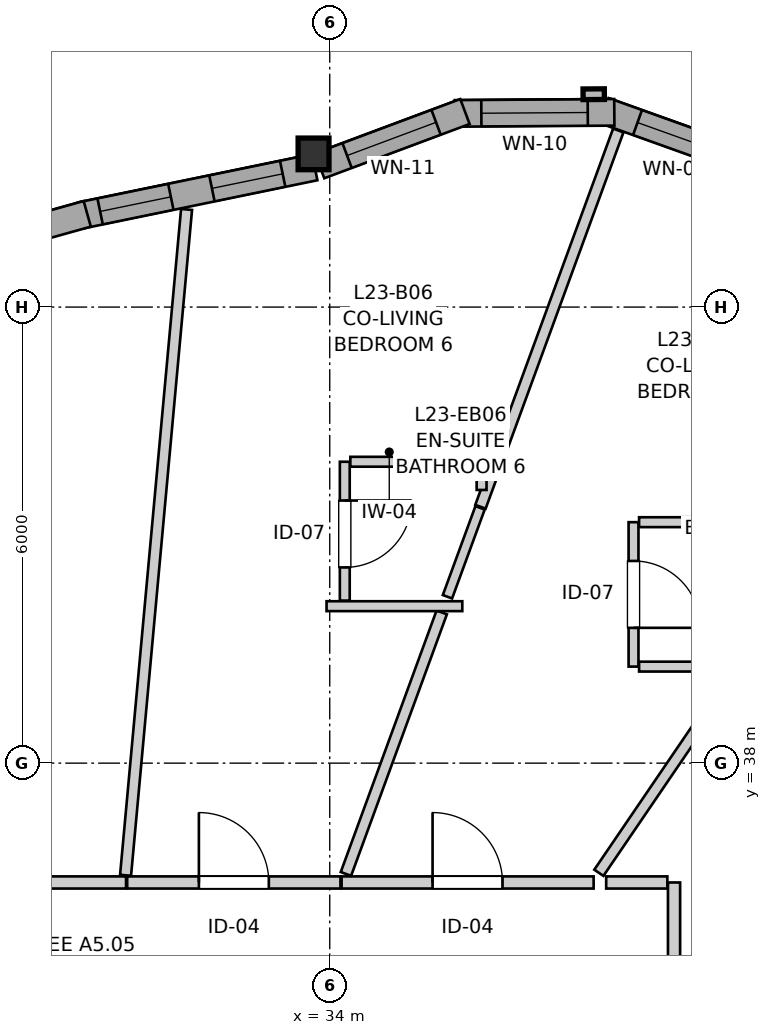
"""IFC4 building model, lengths in metres.
Left out: names, types, materials, properties, quantities, classifications, styles, units other than length and angle.
Written with IfcOpenShell. Run it as: python <this file> out.ifc"""

import sys

from ifc_helpers import new_model, si_unit, direction, frame, frame_2d, origin, origin_2d, place, context, subcontext, project, spatial, rectangle, i_section, extrude, source, transform, mapped, element, fill, save


model = new_model("IFC4")
c1 = context("Model", 3, precision=1e-05, world=origin(), true_north=direction((0.0, 1.0)))
c2 = subcontext(c1, "Body", "Model", "MODEL_VIEW")
j1 = project(units=[si_unit("LENGTHUNIT", "METRE"), si_unit("PLANEANGLEUNIT", "RADIAN")], contexts=[c1])
p1 = place(None, origin())
s1 = spatial("IfcSite", under=j1, at=p1, CompositionType="ELEMENT")
p2 = place(p1, origin())
s2 = spatial("IfcBuilding", under=s1, at=p2, CompositionType="ELEMENT")
p3 = place(p2, frame((0.0, 0.0, 80.0)))
s3 = spatial("IfcBuildingStorey", under=s2, at=p3, CompositionType="ELEMENT", Elevation=80.0)
m1 = source(origin(), c2, "Body", "SweptSolid", [
    extrude(i_section(OverallWidth=0.406, OverallDepth=0.416, WebThickness=0.027, FlangeThickness=0.044, FilletRadius=0.015, at=origin_2d()), origin(), (0.0, 0.0, 1.0), 2.935),
])
p4 = place(p3, frame((33.787, 46.015, 0.0), z_axis=(0.0, 0.0, 1.0), x_axis=(1.0, 0.0, 0.0)))
e1 = element("IfcColumn", 1, at=p4, inside=s3, PredefinedType="PILASTER", context=c2, shape_type="MappedRepresentation", body=[
    mapped(m1, transform((0.0, 0.0, 0.0), x_axis=(1.0, 0.0, 0.0), y_axis=(0.0, 1.0, 0.0), z_axis=(0.0, 0.0, 1.0), scale=1.0)),
])
p5 = place(p3, frame((39.586, 45.877, 0.0), z_axis=(0.0, 0.0, 1.0), x_axis=(-0.941473186867, 0.33708787936, 0.0)))
e2 = element("IfcWall", 2, at=p5, inside=s3, PredefinedType="SOLIDWALL", context=c2, shape_type="SweptSolid", body=[
    extrude(rectangle(XDim=2.099, YDim=0.35, at=frame_2d((1.049, 0.0))), origin(), (0.0, 0.0, 1.0), 2.465),
])
p6 = place(p5, frame((0.283, 0.0, 0.82)))
e3 = element("IfcOpeningElement", 3, at=p6, cuts=e2, PredefinedType="OPENING", context=c2, shape_type="SweptSolid", body=[
    extrude(rectangle(XDim=1.35, YDim=1.45, at=frame_2d((0.675, 0.725))), frame((0.0, 0.185, 0.0), z_axis=(0.0, -1.0, 0.0), x_axis=(1.0, 0.0, 0.0)), (0.0, 0.0, 1.0), 0.37),
])
p7 = place(p3, frame((37.744, 46.562, 0.0), z_axis=(0.0, 0.0, 1.0), x_axis=(-0.999976451414, -0.006862697526, 0.0)))
e4 = element("IfcWall", 4, at=p7, inside=s3, PredefinedType="SOLIDWALL", context=c2, shape_type="SweptSolid", body=[
    extrude(rectangle(XDim=2.099, YDim=0.35, at=frame_2d((1.049, 0.0))), origin(), (0.0, 0.0, 1.0), 2.465),
])
p8 = place(p7, frame((0.35, 0.0, 0.82)))
e5 = element("IfcOpeningElement", 5, at=p8, cuts=e4, PredefinedType="OPENING", context=c2, shape_type="SweptSolid", body=[
    extrude(rectangle(XDim=1.4, YDim=1.35, at=frame_2d((0.7, 0.675))), frame((0.0, 0.185, 0.0), z_axis=(0.0, -1.0, 0.0), x_axis=(1.0, 0.0, 0.0)), (0.0, 0.0, 1.0), 0.37),
])
p9 = place(p3, frame((35.779, 46.573, 0.0), z_axis=(0.0, 0.0, 1.0), x_axis=(-0.9368002254, -0.349864741994, 0.0)))
e6 = element("IfcWall", 6, at=p9, inside=s3, PredefinedType="SOLIDWALL", context=c2, shape_type="SweptSolid", body=[
    extrude(rectangle(XDim=2.041, YDim=0.35, at=frame_2d((1.021, 0.0))), origin(), (0.0, 0.0, 1.0), 2.465),
])
p10 = place(p9, frame((0.406, 0.0, 0.82)))
e7 = element("IfcOpeningElement", 7, at=p10, cuts=e6, PredefinedType="OPENING", context=c2, shape_type="SweptSolid", body=[
    extrude(rectangle(XDim=1.25, YDim=1.35, at=frame_2d((0.625, 0.675))), frame((0.0, 0.185, 0.0), z_axis=(0.0, -1.0, 0.0), x_axis=(1.0, 0.0, 0.0)), (0.0, 0.0, 1.0), 0.37),
])
p11 = place(p3, frame((33.803, 45.84, 0.0), z_axis=(0.0, 0.0, 1.0), x_axis=(-0.97943222174, -0.201773444777, 0.0)))
e8 = element("IfcWall", 8, at=p11, inside=s3, PredefinedType="SOLIDWALL", context=c2, shape_type="SweptSolid", body=[
    extrude(rectangle(XDim=3.144, YDim=0.35, at=frame_2d((1.572, 0.0))), origin(), (0.0, 0.0, 1.0), 2.465),
])
p12 = place(p11, frame((0.431, 0.0, 0.82)))
e9 = element("IfcOpeningElement", 9, at=p12, cuts=e8, PredefinedType="OPENING", context=c2, shape_type="SweptSolid", body=[
    extrude(rectangle(XDim=0.95, YDim=1.35, at=frame_2d((0.475, 0.675))), frame((0.0, 0.185, 0.0), z_axis=(0.0, -1.0, 0.0), x_axis=(1.0, 0.0, 0.0)), (0.0, 0.0, 1.0), 0.37),
])
p13 = place(p11, frame((1.933, 0.0, 0.82)))
e10 = element("IfcOpeningElement", 10, at=p13, cuts=e8, PredefinedType="OPENING", context=c2, shape_type="SweptSolid", body=[
    extrude(rectangle(XDim=0.95, YDim=1.35, at=frame_2d((0.475, 0.675))), frame((0.0, 0.185, 0.0), z_axis=(0.0, -1.0, 0.0), x_axis=(1.0, 0.0, 0.0)), (0.0, 0.0, 1.0), 0.37),
])
p14 = place(p3, frame((30.809, 45.227, 0.0), z_axis=(0.0, 0.0, 1.0), x_axis=(-0.963041637143, -0.269352566591, 0.0)))
e11 = element("IfcWall", 11, at=p14, inside=s3, PredefinedType="SOLIDWALL", context=c2, shape_type="SweptSolid", body=[
    extrude(rectangle(XDim=2.873, YDim=0.35, at=frame_2d((1.437, 0.0))), origin(), (0.0, 0.0, 1.0), 2.465),
])
p15 = place(p14, frame((0.717, 0.0, 0.82)))
e12 = element("IfcOpeningElement", 12, at=p15, cuts=e11, PredefinedType="OPENING", context=c2, shape_type="SweptSolid", body=[
    extrude(rectangle(XDim=1.45, YDim=1.25, at=frame_2d((0.725, 0.625))), frame((0.0, 0.185, 0.0), z_axis=(0.0, -1.0, 0.0), x_axis=(1.0, 0.0, 0.0)), (0.0, 0.0, 1.0), 0.37),
])
p16 = place(p3, frame((38.53, 36.43, 0.0), z_axis=(0.0, 0.0, 1.0), x_axis=(0.0, -1.0, 0.0)))
e13 = element("IfcWall", 13, at=p16, inside=s3, PredefinedType="PARTITIONING", context=c2, shape_type="SweptSolid", body=[
    extrude(rectangle(XDim=4.559, YDim=0.16, at=frame_2d((2.279, 0.0))), origin(), (0.0, 0.0, 1.0), 2.573),
])
p17 = place(p16, frame((1.646, 0.0, 0.0)))
e14 = element("IfcOpeningElement", 14, at=p17, cuts=e13, PredefinedType="OPENING", context=c2, shape_type="SweptSolid", body=[
    extrude(rectangle(XDim=1.3, YDim=2.1, at=frame_2d((0.65, 1.05))), frame((0.0, 0.09, 0.0), z_axis=(0.0, -1.0, 0.0), x_axis=(1.0, 0.0, 0.0)), (0.0, 0.0, 1.0), 0.18),
])
p18 = place(p3, frame((27.307, 36.43, 0.0), z_axis=(0.0, 0.0, 1.0), x_axis=(1.0, 0.0, 0.0)))
e15 = element("IfcWall", 15, at=p18, inside=s3, PredefinedType="PARTITIONING", context=c2, shape_type="SweptSolid", body=[
    extrude(rectangle(XDim=4.013, YDim=0.16, at=frame_2d((2.007, 0.0))), origin(), (0.0, 0.0, 1.0), 2.935),
])
p19 = place(p18, frame((0.22, 0.0, 0.0)))
e16 = element("IfcOpeningElement", 16, at=p19, cuts=e15, PredefinedType="OPENING", context=c2, shape_type="SweptSolid", body=[
    extrude(rectangle(XDim=0.96, YDim=2.1, at=frame_2d((0.48, 1.05))), frame((0.0, 0.09, 0.0), z_axis=(0.0, -1.0, 0.0), x_axis=(1.0, 0.0, 0.0)), (0.0, 0.0, 1.0), 0.18),
])
p20 = place(p3, frame((34.156, 36.43, 0.0), z_axis=(0.0, 0.0, 1.0), x_axis=(1.0, 0.0, 0.0)))
e17 = element("IfcWall", 17, at=p20, inside=s3, PredefinedType="PARTITIONING", context=c2, shape_type="SweptSolid", body=[
    extrude(rectangle(XDim=3.316, YDim=0.16, at=frame_2d((1.658, 0.0))), origin(), (0.0, 0.0, 1.0), 2.935),
])
p21 = place(p20, frame((1.197, 0.0, 0.0)))
e18 = element("IfcOpeningElement", 18, at=p21, cuts=e17, PredefinedType="OPENING", context=c2, shape_type="SweptSolid", body=[
    extrude(rectangle(XDim=0.92, YDim=2.1, at=frame_2d((0.46, 1.05))), frame((0.0, 0.09, 0.0), z_axis=(0.0, -1.0, 0.0), x_axis=(1.0, 0.0, 0.0)), (0.0, 0.0, 1.0), 0.18),
])
p22 = place(p3, frame((31.335, 36.43, 0.0), z_axis=(0.0, 0.0, 1.0), x_axis=(1.0, 0.0, 0.0)))
e19 = element("IfcWall", 19, at=p22, inside=s3, PredefinedType="PARTITIONING", context=c2, shape_type="SweptSolid", body=[
    extrude(rectangle(XDim=2.806, YDim=0.16, at=frame_2d((1.403, 0.0))), origin(), (0.0, 0.0, 1.0), 2.935),
])
p23 = place(p22, frame((0.944, 0.0, 0.0)))
e20 = element("IfcOpeningElement", 20, at=p23, cuts=e19, PredefinedType="OPENING", context=c2, shape_type="SweptSolid", body=[
    extrude(rectangle(XDim=0.92, YDim=2.1, at=frame_2d((0.46, 1.05))), frame((0.0, 0.09, 0.0), z_axis=(0.0, -1.0, 0.0), x_axis=(1.0, 0.0, 0.0)), (0.0, 0.0, 1.0), 0.18),
])
p24 = place(p3, frame((34.198, 41.965, 0.0), z_axis=(0.0, 0.0, 1.0), x_axis=(0.0, -1.0, 0.0)))
e21 = element("IfcWall", 21, at=p24, inside=s3, PredefinedType="PARTITIONING", context=c2, shape_type="SweptSolid", body=[
    extrude(rectangle(XDim=1.827, YDim=0.13, at=frame_2d((0.914, 0.0))), origin(), (0.0, 0.0, 1.0), 2.935),
])
p25 = place(p24, frame((0.51, 0.0, 0.0)))
e22 = element("IfcOpeningElement", 22, at=p25, cuts=e21, PredefinedType="OPENING", context=c2, shape_type="SweptSolid", body=[
    extrude(rectangle(XDim=0.88, YDim=2.05, at=frame_2d((0.44, 1.025))), frame((0.0, 0.075, 0.0), z_axis=(0.0, -1.0, 0.0), x_axis=(1.0, 0.0, 0.0)), (0.0, 0.0, 1.0), 0.15),
])
p26 = place(p3, frame((37.997, 41.17, 0.0), z_axis=(0.0, 0.0, 1.0), x_axis=(0.0, -1.0, 0.0)))
e23 = element("IfcWall", 23, at=p26, inside=s3, PredefinedType="PARTITIONING", context=c2, shape_type="SweptSolid", body=[
    extrude(rectangle(XDim=1.9, YDim=0.13, at=frame_2d((0.95, 0.0))), origin(), (0.0, 0.0, 1.0), 2.935),
])
p27 = place(p26, frame((0.51, 0.0, 0.0)))
e24 = element("IfcOpeningElement", 24, at=p27, cuts=e23, PredefinedType="OPENING", context=c2, shape_type="SweptSolid", body=[
    extrude(rectangle(XDim=0.88, YDim=2.05, at=frame_2d((0.44, 1.025))), frame((0.0, 0.075, 0.0), z_axis=(0.0, -1.0, 0.0), x_axis=(1.0, 0.0, 0.0)), (0.0, 0.0, 1.0), 0.15),
])
p28 = place(p3, frame((31.314, 36.525, 0.0), z_axis=(0.0, 0.0, 1.0), x_axis=(0.091226381691, 0.995830179942, 0.0)))
e25 = element("IfcWall", 25, at=p28, inside=s3, PredefinedType="PARTITIONING", context=c2, shape_type="SweptSolid", body=[
    extrude(rectangle(XDim=8.797, YDim=0.145, at=frame_2d((4.398, 0.0))), origin(), (0.0, 0.0, 1.0), 2.935),
])
p29 = place(p3, frame((38.659, 31.93, 0.0), z_axis=(0.0, 0.0, 1.0), x_axis=(0.813936175568, 0.580954302938, 0.0)))
e26 = element("IfcWall", 26, at=p29, inside=s3, PredefinedType="PARTITIONING", context=c2, shape_type="SweptSolid", body=[
    extrude(rectangle(XDim=6.346, YDim=0.145, at=frame_2d((3.173, 0.0))), origin(), (0.0, 0.0, 1.0), 2.935),
])
p30 = place(p3, frame((35.983, 41.373, 0.0), z_axis=(0.0, 0.0, 1.0), x_axis=(0.343972978133, 0.938979547335, 0.0)))
e27 = element("IfcWall", 27, at=p30, inside=s3, PredefinedType="PARTITIONING", context=c2, shape_type="SweptSolid", body=[
    extrude(rectangle(XDim=5.272, YDim=0.145, at=frame_2d((2.636, 0.0))), origin(), (0.0, 0.0, 1.0), 2.935),
])
p31 = place(p3, frame((34.213, 36.542, 0.0), z_axis=(0.0, 0.0, 1.0), x_axis=(0.343978558693, 0.93897750301, 0.0)))
e28 = element("IfcWall", 28, at=p31, inside=s3, PredefinedType="PARTITIONING", context=c2, shape_type="SweptSolid", body=[
    extrude(rectangle(XDim=3.664, YDim=0.145, at=frame_2d((1.832, 0.0))), origin(), (0.0, 0.0, 1.0), 2.935),
])
p32 = place(p3, frame((37.541, 36.557, 0.0), z_axis=(0.0, 0.0, 1.0), x_axis=(0.563020017907, 0.826443258449, 0.0)))
e29 = element("IfcWall", 29, at=p32, inside=s3, PredefinedType="PARTITIONING", context=c2, shape_type="SweptSolid", body=[
    extrude(rectangle(XDim=3.3, YDim=0.145, at=frame_2d((1.65, 0.0))), origin(), (0.0, 0.0, 1.0), 2.935),
])
p33 = place(p3, frame((38.07, 41.17, 0.0), z_axis=(0.0, 0.0, 1.0), x_axis=(1.0, 0.0, 0.0)))
e30 = element("IfcWall", 30, at=p33, inside=s3, PredefinedType="PARTITIONING", context=c2, shape_type="SweptSolid", body=[
    extrude(rectangle(XDim=1.727, YDim=0.13, at=frame_2d((0.864, 0.0))), origin(), (0.0, 0.0, 1.0), 2.935),
])
p34 = place(p3, frame((34.271, 41.965, 0.0), z_axis=(0.0, 0.0, 1.0), x_axis=(1.0, 0.0, 0.0)))
e31 = element("IfcWall", 31, at=p34, inside=s3, PredefinedType="PARTITIONING", context=c2, shape_type="SweptSolid", body=[
    extrude(rectangle(XDim=1.727, YDim=0.13, at=frame_2d((0.864, 0.0))), origin(), (0.0, 0.0, 1.0), 2.103),
])
p35 = place(p3, frame((38.07, 39.27, 0.0), z_axis=(0.0, 0.0, 1.0), x_axis=(1.0, 0.0, 0.0)))
e32 = element("IfcWall", 32, at=p35, inside=s3, PredefinedType="PARTITIONING", context=c2, shape_type="SweptSolid", body=[
    extrude(rectangle(XDim=1.179, YDim=0.13, at=frame_2d((0.589, 0.0))), origin(), (0.0, 0.0, 1.0), 2.935),
])
p36 = place(p3, frame((35.549, 40.189, 0.0), z_axis=(0.0, 0.0, 1.0), x_axis=(0.344070409158, 0.938943850048, 0.0)))
e33 = element("IfcWall", 33, at=p36, inside=s3, PredefinedType="PARTITIONING", context=c2, shape_type="SweptSolid", body=[
    extrude(rectangle(XDim=1.246, YDim=0.13, at=frame_2d((0.623, 0.0))), origin(), (0.0, 0.0, 1.0), 2.935),
])
p37 = place(p3, frame((33.958, 40.065, 0.0), z_axis=(0.0, 0.0, 1.0), x_axis=(1.0, 0.0, 0.0)))
e34 = element("IfcWall", 34, at=p37, inside=s3, PredefinedType="PARTITIONING", context=c2, shape_type="SweptSolid", body=[
    extrude(rectangle(XDim=1.786, YDim=0.13, at=frame_2d((0.893, 0.0))), origin(), (0.0, 0.0, 1.0), 2.935),
])
p38 = place(p3, frame((37.637, 36.43, 0.0), z_axis=(0.0, 0.0, 1.0), x_axis=(1.0, 0.0, 0.0)))
e35 = element("IfcWall", 35, at=p38, inside=s3, PredefinedType="PARTITIONING", context=c2, shape_type="SweptSolid", body=[
    extrude(rectangle(XDim=0.805, YDim=0.16, at=frame_2d((0.402, 0.0))), origin(), (0.0, 0.0, 1.0), 2.935),
])
p39 = place(p3, frame((35.998, 41.594, 0.0), z_axis=(0.0, 0.0, 1.0), x_axis=(0.0, 1.0, 0.0)))
e36 = element("IfcWall", 36, at=p39, inside=s3, PredefinedType="PARTITIONING", context=c2, shape_type="SweptSolid", body=[
    extrude(rectangle(XDim=0.371, YDim=0.13, at=frame_2d((0.186, 0.0))), origin(), (0.0, 0.0, 1.0), 2.935),
])
m2 = source(origin(), c2, "Body", "SweptSolid", [
    extrude(rectangle(XDim=1.35, YDim=1.45, at=frame_2d((0.675, 0.725))), frame((0.0, 0.03, 0.0), z_axis=(0.0, -1.0, 0.0), x_axis=(1.0, 0.0, 0.0)), (0.0, 0.0, 1.0), 0.06),
])
p40 = place(p6, origin())
e37 = element("IfcWindow", 37, at=p40, inside=s3, PartitioningType="SINGLE_PANEL", PredefinedType="WINDOW", context=c2, shape_type="MappedRepresentation", body=[
    mapped(m2, transform((0.0, 0.0, 0.0), x_axis=(1.0, 0.0, 0.0), y_axis=(0.0, 1.0, 0.0), z_axis=(0.0, 0.0, 1.0), scale=1.0)),
])
fill(e3, e37)
m3 = source(origin(), c2, "Body", "SweptSolid", [
    extrude(rectangle(XDim=1.4, YDim=1.35, at=frame_2d((0.7, 0.675))), frame((0.0, 0.03, 0.0), z_axis=(0.0, -1.0, 0.0), x_axis=(1.0, 0.0, 0.0)), (0.0, 0.0, 1.0), 0.06),
])
p41 = place(p8, origin())
e38 = element("IfcWindow", 38, at=p41, inside=s3, PartitioningType="SINGLE_PANEL", PredefinedType="WINDOW", context=c2, shape_type="MappedRepresentation", body=[
    mapped(m3, transform((0.0, 0.0, 0.0), x_axis=(1.0, 0.0, 0.0), y_axis=(0.0, 1.0, 0.0), z_axis=(0.0, 0.0, 1.0), scale=1.0)),
])
fill(e5, e38)
m4 = source(origin(), c2, "Body", "SweptSolid", [
    extrude(rectangle(XDim=1.25, YDim=1.35, at=frame_2d((0.625, 0.675))), frame((0.0, 0.03, 0.0), z_axis=(0.0, -1.0, 0.0), x_axis=(1.0, 0.0, 0.0)), (0.0, 0.0, 1.0), 0.06),
])
p42 = place(p10, origin())
e39 = element("IfcWindow", 39, at=p42, inside=s3, PartitioningType="SINGLE_PANEL", PredefinedType="WINDOW", context=c2, shape_type="MappedRepresentation", body=[
    mapped(m4, transform((0.0, 0.0, 0.0), x_axis=(1.0, 0.0, 0.0), y_axis=(0.0, 1.0, 0.0), z_axis=(0.0, 0.0, 1.0), scale=1.0)),
])
fill(e7, e39)
m5 = source(origin(), c2, "Body", "SweptSolid", [
    extrude(rectangle(XDim=0.95, YDim=1.35, at=frame_2d((0.475, 0.675))), frame((0.0, 0.03, 0.0), z_axis=(0.0, -1.0, 0.0), x_axis=(1.0, 0.0, 0.0)), (0.0, 0.0, 1.0), 0.06),
])
p43 = place(p12, origin())
e40 = element("IfcWindow", 40, at=p43, inside=s3, PartitioningType="SINGLE_PANEL", PredefinedType="WINDOW", context=c2, shape_type="MappedRepresentation", body=[
    mapped(m5, transform((0.0, 0.0, 0.0), x_axis=(1.0, 0.0, 0.0), y_axis=(0.0, 1.0, 0.0), z_axis=(0.0, 0.0, 1.0), scale=1.0)),
])
fill(e9, e40)
p44 = place(p13, origin())
e41 = element("IfcWindow", 41, at=p44, inside=s3, PartitioningType="SINGLE_PANEL", PredefinedType="WINDOW", context=c2, shape_type="MappedRepresentation", body=[
    mapped(m5, transform((0.0, 0.0, 0.0), x_axis=(1.0, 0.0, 0.0), y_axis=(0.0, 1.0, 0.0), z_axis=(0.0, 0.0, 1.0), scale=1.0)),
])
fill(e10, e41)
m6 = source(origin(), c2, "Body", "SweptSolid", [
    extrude(rectangle(XDim=0.92, YDim=2.1, at=frame_2d((0.46, 1.05))), frame((0.0, 0.025, 0.0), z_axis=(0.0, -1.0, 0.0), x_axis=(1.0, 0.0, 0.0)), (0.0, 0.0, 1.0), 0.05),
])
p45 = place(p21, origin())
e42 = element("IfcDoor", 42, at=p45, inside=s3, OperationType="SINGLE_SWING_LEFT", PredefinedType="DOOR", context=c2, shape_type="MappedRepresentation", body=[
    mapped(m6, transform((0.0, 0.0, 0.0), x_axis=(1.0, 0.0, 0.0), y_axis=(0.0, 1.0, 0.0), z_axis=(0.0, 0.0, 1.0), scale=1.0)),
])
fill(e18, e42)
p46 = place(p23, origin())
e43 = element("IfcDoor", 43, at=p46, inside=s3, OperationType="SINGLE_SWING_LEFT", PredefinedType="DOOR", context=c2, shape_type="MappedRepresentation", body=[
    mapped(m6, transform((0.0, 0.0, 0.0), x_axis=(1.0, 0.0, 0.0), y_axis=(0.0, 1.0, 0.0), z_axis=(0.0, 0.0, 1.0), scale=1.0)),
])
fill(e20, e43)
m7 = source(origin(), c2, "Body", "SweptSolid", [
    extrude(rectangle(XDim=0.88, YDim=2.05, at=frame_2d((0.44, 1.025))), frame((0.0, 0.025, 0.0), z_axis=(0.0, -1.0, 0.0), x_axis=(1.0, 0.0, 0.0)), (0.0, 0.0, 1.0), 0.05),
])
p47 = place(p25, origin())
e44 = element("IfcDoor", 44, at=p47, inside=s3, OperationType="SINGLE_SWING_LEFT", PredefinedType="DOOR", context=c2, shape_type="MappedRepresentation", body=[
    mapped(m7, transform((0.0, 0.0, 0.0), x_axis=(1.0, 0.0, 0.0), y_axis=(0.0, 1.0, 0.0), z_axis=(0.0, 0.0, 1.0), scale=1.0)),
])
fill(e22, e44)
p48 = place(p27, origin())
e45 = element("IfcDoor", 45, at=p48, inside=s3, OperationType="SINGLE_SWING_RIGHT", PredefinedType="DOOR", context=c2, shape_type="MappedRepresentation", body=[
    mapped(m7, transform((0.0, 0.0, 0.0), x_axis=(1.0, 0.0, 0.0), y_axis=(0.0, 1.0, 0.0), z_axis=(0.0, 0.0, 1.0), scale=1.0)),
])
fill(e24, e45)
save(model, sys.argv[1])
